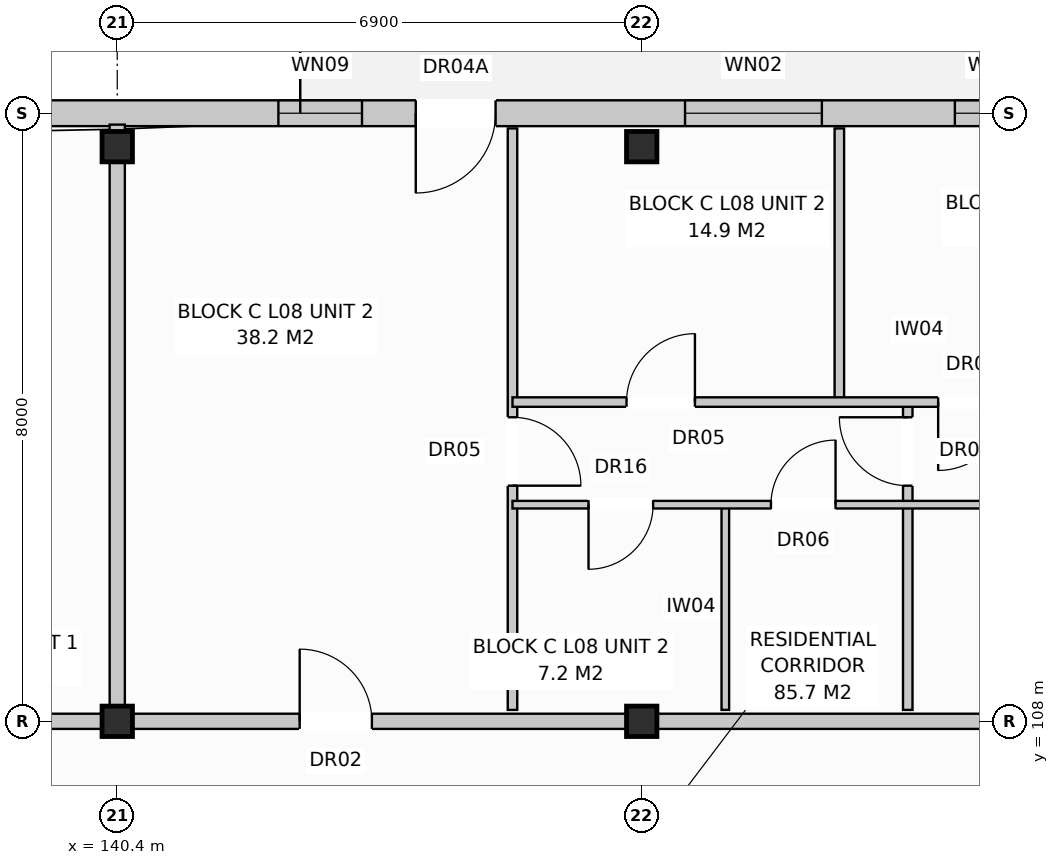
"""IFC4 building model, lengths in metres.
Left out: names, types, materials, properties, quantities, classifications, styles, units other than length and angle.
Written with IfcOpenShell. Run it as: python <this file> out.ifc"""

import sys

from ifc_helpers import new_model, si_unit, direction, frame, frame_2d, origin, origin_with_axes, origin_2d, place, context, subcontext, project, spatial, rectangle, extrude, element, fill, save


model = new_model("IFC4")
c1 = context("Model", 3, precision=1e-05, world=origin(), true_north=direction((0.0, 1.0)))
c2 = subcontext(c1, "Body", "Model", "MODEL_VIEW")
j1 = project(units=[si_unit("LENGTHUNIT", "METRE"), si_unit("PLANEANGLEUNIT", "RADIAN")], contexts=[c1])
p1 = place(None, origin())
s1 = spatial("IfcSite", under=j1, at=p1, CompositionType="ELEMENT")
p2 = place(p1, origin())
s2 = spatial("IfcBuilding", under=s1, at=p2, CompositionType="ELEMENT")
p3 = place(p2, frame((0.0, 0.0, 27.2)))
s3 = spatial("IfcBuildingStorey", under=s2, at=p3, CompositionType="ELEMENT", Elevation=27.2)
for number, where, z_axis, x_axis in (
    (1, (140.4, 108.0, 0.0), (0.0, 0.0, 1.0), (1.0, 0.0, 0.0)),
    (2, (140.4, 115.56, 0.0), (0.0, 0.0, 1.0), (1.0, 0.0, 0.0)),
    (3, (147.3, 108.0, 0.0), (0.0, 0.0, 1.0), (1.0, 0.0, 0.0)),
    (4, (147.3, 115.56, 0.0), (0.0, 0.0, 1.0), (1.0, 0.0, 0.0)),
):
    element("IfcColumn", number, at=place(p3, frame(where, z_axis=z_axis, x_axis=x_axis)), inside=s3, PredefinedType="COLUMN", context=c2, shape_type="SweptSolid", body=[
        extrude(rectangle(XDim=0.4, YDim=0.4, at=origin_2d()), origin(), (0.0, 0.0, 1.0), 3.2),
    ])
p4 = place(p3, frame((126.76, 116.0, 0.0), z_axis=(0.0, 0.0, 1.0), x_axis=(1.0, 0.0, 0.0)))
e5 = element("IfcWall", 5, at=p4, inside=s3, PredefinedType="STANDARD", context=c2, shape_type="SweptSolid", body=[
    extrude(rectangle(XDim=41.08, YDim=0.34, at=frame_2d((20.54, 0.0))), origin(), (0.0, 0.0, 1.0), 2.96),
])
p5 = place(p4, frame((2.767, 0.0, 0.0)))
e6 = element("IfcOpeningElement", 6, at=p5, cuts=e5, PredefinedType="OPENING", context=c2, shape_type="SweptSolid", body=[
    extrude(rectangle(XDim=1.05, YDim=2.12, at=frame_2d((0.525, 1.06))), frame((0.0, 0.182, 0.0), z_axis=(0.0, -1.0, 0.0), x_axis=(1.0, 0.0, 0.0)), (0.0, 0.0, 1.0), 0.364),
])
p6 = place(p4, frame((17.567, 0.0, 0.0)))
e7 = element("IfcOpeningElement", 7, at=p6, cuts=e5, PredefinedType="OPENING", context=c2, shape_type="SweptSolid", body=[
    extrude(rectangle(XDim=1.05, YDim=2.12, at=frame_2d((0.525, 1.06))), frame((0.0, 0.182, 0.0), z_axis=(0.0, -1.0, 0.0), x_axis=(1.0, 0.0, 0.0)), (0.0, 0.0, 1.0), 0.364),
])
p7 = place(p4, frame((30.067, 0.0, 0.0)))
e8 = element("IfcOpeningElement", 8, at=p7, cuts=e5, PredefinedType="OPENING", context=c2, shape_type="SweptSolid", body=[
    extrude(rectangle(XDim=1.05, YDim=2.12, at=frame_2d((0.525, 1.06))), frame((0.0, 0.182, 0.0), z_axis=(0.0, -1.0, 0.0), x_axis=(1.0, 0.0, 0.0)), (0.0, 0.0, 1.0), 0.364),
])
p8 = place(p4, frame((0.642, 0.0, 0.8)))
e9 = element("IfcOpeningElement", 9, at=p8, cuts=e5, PredefinedType="OPENING", context=c2, shape_type="SweptSolid", body=[
    extrude(rectangle(XDim=1.9, YDim=1.85, at=frame_2d((0.95, 0.925))), frame((0.0, 0.182, 0.0), z_axis=(0.0, -1.0, 0.0), x_axis=(1.0, 0.0, 0.0)), (0.0, 0.0, 1.0), 0.364),
])
p9 = place(p4, frame((4.41, 0.0, 0.8)))
e10 = element("IfcOpeningElement", 10, at=p9, cuts=e5, PredefinedType="OPENING", context=c2, shape_type="SweptSolid", body=[
    extrude(rectangle(XDim=1.8, YDim=1.7, at=frame_2d((0.9, 0.85))), frame((0.0, 0.182, 0.0), z_axis=(0.0, -1.0, 0.0), x_axis=(1.0, 0.0, 0.0)), (0.0, 0.0, 1.0), 0.364),
])
p10 = place(p4, frame((10.46, 0.0, 0.72)))
e11 = element("IfcOpeningElement", 11, at=p10, cuts=e5, PredefinedType="OPENING", context=c2, shape_type="SweptSolid", body=[
    extrude(rectangle(XDim=1.1, YDim=1.5, at=frame_2d((0.55, 0.75))), frame((0.0, 0.182, 0.0), z_axis=(0.0, -1.0, 0.0), x_axis=(1.0, 0.0, 0.0)), (0.0, 0.0, 1.0), 0.364),
])
p11 = place(p4, frame((15.76, 0.0, 0.72)))
e12 = element("IfcOpeningElement", 12, at=p11, cuts=e5, PredefinedType="OPENING", context=c2, shape_type="SweptSolid", body=[
    extrude(rectangle(XDim=1.1, YDim=1.5, at=frame_2d((0.55, 0.75))), frame((0.0, 0.182, 0.0), z_axis=(0.0, -1.0, 0.0), x_axis=(1.0, 0.0, 0.0)), (0.0, 0.0, 1.0), 0.364),
])
p12 = place(p4, frame((21.11, 0.0, 0.8)))
e13 = element("IfcOpeningElement", 13, at=p12, cuts=e5, PredefinedType="OPENING", context=c2, shape_type="SweptSolid", body=[
    extrude(rectangle(XDim=1.8, YDim=1.7, at=frame_2d((0.9, 0.85))), frame((0.0, 0.182, 0.0), z_axis=(0.0, -1.0, 0.0), x_axis=(1.0, 0.0, 0.0)), (0.0, 0.0, 1.0), 0.364),
])
p13 = place(p4, frame((24.66, 0.0, 0.72)))
e14 = element("IfcOpeningElement", 14, at=p13, cuts=e5, PredefinedType="OPENING", context=c2, shape_type="SweptSolid", body=[
    extrude(rectangle(XDim=1.1, YDim=1.5, at=frame_2d((0.55, 0.75))), frame((0.0, 0.182, 0.0), z_axis=(0.0, -1.0, 0.0), x_axis=(1.0, 0.0, 0.0)), (0.0, 0.0, 1.0), 0.364),
])
p14 = place(p4, frame((27.892, 0.0, 0.8)))
e15 = element("IfcOpeningElement", 15, at=p14, cuts=e5, PredefinedType="OPENING", context=c2, shape_type="SweptSolid", body=[
    extrude(rectangle(XDim=1.95, YDim=1.65, at=frame_2d((0.975, 0.825))), frame((0.0, 0.182, 0.0), z_axis=(0.0, -1.0, 0.0), x_axis=(1.0, 0.0, 0.0)), (0.0, 0.0, 1.0), 0.364),
])
p15 = place(p4, frame((31.91, 0.0, 0.8)))
e16 = element("IfcOpeningElement", 16, at=p15, cuts=e5, PredefinedType="OPENING", context=c2, shape_type="SweptSolid", body=[
    extrude(rectangle(XDim=1.8, YDim=1.7, at=frame_2d((0.9, 0.85))), frame((0.0, 0.182, 0.0), z_axis=(0.0, -1.0, 0.0), x_axis=(1.0, 0.0, 0.0)), (0.0, 0.0, 1.0), 0.364),
])
p16 = place(p4, frame((35.36, 0.0, 0.72)))
e17 = element("IfcOpeningElement", 17, at=p16, cuts=e5, PredefinedType="OPENING", context=c2, shape_type="SweptSolid", body=[
    extrude(rectangle(XDim=1.9, YDim=1.85, at=frame_2d((0.95, 0.925))), frame((0.0, 0.182, 0.0), z_axis=(0.0, -1.0, 0.0), x_axis=(1.0, 0.0, 0.0)), (0.0, 0.0, 1.0), 0.364),
])
p17 = place(p4, frame((38.525, 0.0, 0.8)))
e18 = element("IfcOpeningElement", 18, at=p17, cuts=e5, PredefinedType="OPENING", context=c2, shape_type="SweptSolid", body=[
    extrude(rectangle(XDim=1.95, YDim=1.65, at=frame_2d((0.975, 0.825))), frame((0.0, 0.182, 0.0), z_axis=(0.0, -1.0, 0.0), x_axis=(1.0, 0.0, 0.0)), (0.0, 0.0, 1.0), 0.364),
])
p18 = place(p3, frame((140.4, 108.15, 0.0), z_axis=(0.0, 0.0, 1.0), x_axis=(0.0, 1.0, 0.0)))
e19 = element("IfcWall", 19, at=p18, inside=s3, PredefinedType="PARTITIONING", context=c2, shape_type="SweptSolid", body=[
    extrude(rectangle(XDim=7.7, YDim=0.2, at=frame_2d((3.85, 0.0))), origin(), (0.0, 0.0, 1.0), 2.96),
])
p19 = place(p3, frame((126.6, 108.0, 0.0), z_axis=(0.0, 0.0, 1.0), x_axis=(1.0, 0.0, 0.0)))
e20 = element("IfcWall", 20, at=p19, inside=s3, PredefinedType="PARTITIONING", context=c2, shape_type="SweptSolid", body=[
    extrude(rectangle(XDim=13.8, YDim=0.2, at=frame_2d((6.9, 0.0))), origin(), (0.0, 0.0, 1.0), 2.4),
])
p20 = place(p19, frame((9.6, 0.0, 0.0)))
e21 = element("IfcOpeningElement", 21, at=p20, cuts=e20, PredefinedType="OPENING", context=c2, shape_type="SweptSolid", body=[
    extrude(rectangle(XDim=0.95, YDim=2.15, at=frame_2d((0.475, 1.075))), frame((0.0, 0.112, 0.0), z_axis=(0.0, -1.0, 0.0), x_axis=(1.0, 0.0, 0.0)), (0.0, 0.0, 1.0), 0.224),
])
p21 = place(p3, frame((140.4, 108.0, 0.0), z_axis=(0.0, 0.0, 1.0), x_axis=(1.0, 0.0, 0.0)))
e22 = element("IfcWall", 22, at=p21, inside=s3, PredefinedType="PARTITIONING", context=c2, shape_type="SweptSolid", body=[
    extrude(rectangle(XDim=13.8, YDim=0.2, at=frame_2d((6.9, 0.0))), origin(), (0.0, 0.0, 1.0), 2.4),
])
p22 = place(p21, frame((2.4, 0.0, 0.0)))
e23 = element("IfcOpeningElement", 23, at=p22, cuts=e22, PredefinedType="OPENING", context=c2, shape_type="SweptSolid", body=[
    extrude(rectangle(XDim=0.95, YDim=2.15, at=frame_2d((0.475, 1.075))), frame((0.0, 0.112, 0.0), z_axis=(0.0, -1.0, 0.0), x_axis=(1.0, 0.0, 0.0)), (0.0, 0.0, 1.0), 0.224),
])
p23 = place(p3, frame((145.6, 108.15, 0.0), z_axis=(0.0, 0.0, 1.0), x_axis=(0.0, 1.0, 0.0)))
e24 = element("IfcWall", 24, at=p23, inside=s3, PredefinedType="PARTITIONING", context=c2, shape_type="SweptSolid", body=[
    extrude(rectangle(XDim=7.65, YDim=0.125, at=frame_2d((3.825, 0.0))), origin(), (0.0, 0.0, 1.0), 2.96),
])
p24 = place(p23, frame((2.95, 0.0, 0.0)))
e25 = element("IfcOpeningElement", 25, at=p24, cuts=e24, PredefinedType="OPENING", context=c2, shape_type="SweptSolid", body=[
    extrude(rectangle(XDim=0.9, YDim=2.1, at=frame_2d((0.45, 1.05))), frame((0.0, 0.074, 0.0), z_axis=(0.0, -1.0, 0.0), x_axis=(1.0, 0.0, 0.0)), (0.0, 0.0, 1.0), 0.149),
])
p25 = place(p3, frame((148.4, 108.15, 0.0), z_axis=(0.0, 0.0, 1.0), x_axis=(0.0, 1.0, 0.0)))
e26 = element("IfcWall", 26, at=p25, inside=s3, PredefinedType="PARTITIONING", context=c2, shape_type="SweptSolid", body=[
    extrude(rectangle(XDim=2.7, YDim=0.1, at=frame_2d((1.35, 0.0))), origin(), (0.0, 0.0, 1.0), 2.96),
])
p26 = place(p3, frame((150.8, 108.15, 0.0), z_axis=(0.0, 0.0, 1.0), x_axis=(0.0, 1.0, 0.0)))
e27 = element("IfcWall", 27, at=p26, inside=s3, PredefinedType="PARTITIONING", context=c2, shape_type="SweptSolid", body=[
    extrude(rectangle(XDim=4.05, YDim=0.125, at=frame_2d((2.025, 0.0))), origin(), (0.0, 0.0, 1.0), 2.59),
])
p27 = place(p26, frame((2.95, 0.0, 0.0)))
e28 = element("IfcOpeningElement", 28, at=p27, cuts=e27, PredefinedType="OPENING", context=c2, shape_type="SweptSolid", body=[
    extrude(rectangle(XDim=0.9, YDim=2.1, at=frame_2d((0.45, 1.05))), frame((0.0, 0.074, 0.0), z_axis=(0.0, -1.0, 0.0), x_axis=(1.0, 0.0, 0.0)), (0.0, 0.0, 1.0), 0.149),
])
p28 = place(p3, frame((149.9, 112.2, 0.0), z_axis=(0.0, 0.0, 1.0), x_axis=(0.0, 1.0, 0.0)))
e29 = element("IfcWall", 29, at=p28, inside=s3, PredefinedType="PARTITIONING", context=c2, shape_type="SweptSolid", body=[
    extrude(rectangle(XDim=3.6, YDim=0.125, at=frame_2d((1.8, 0.0))), origin(), (0.0, 0.0, 1.0), 2.96),
])
p29 = place(p3, frame((145.6, 110.85, 0.0), z_axis=(0.0, 0.0, 1.0), x_axis=(1.0, 0.0, 0.0)))
e30 = element("IfcWall", 30, at=p29, inside=s3, PredefinedType="PARTITIONING", context=c2, shape_type="SweptSolid", body=[
    extrude(rectangle(XDim=8.5, YDim=0.1, at=frame_2d((4.25, 0.0))), origin(), (0.0, 0.0, 1.0), 2.96),
])
p30 = place(p29, frame((1.0, 0.0, 0.0)))
e31 = element("IfcOpeningElement", 31, at=p30, cuts=e30, PredefinedType="OPENING", context=c2, shape_type="SweptSolid", body=[
    extrude(rectangle(XDim=0.85, YDim=2.1, at=frame_2d((0.425, 1.05))), frame((0.0, 0.062, 0.0), z_axis=(0.0, -1.0, 0.0), x_axis=(1.0, 0.0, 0.0)), (0.0, 0.0, 1.0), 0.124),
])
p31 = place(p29, frame((3.4, 0.0, 0.0)))
e32 = element("IfcOpeningElement", 32, at=p31, cuts=e30, PredefinedType="OPENING", context=c2, shape_type="SweptSolid", body=[
    extrude(rectangle(XDim=0.85, YDim=2.05, at=frame_2d((0.425, 1.025))), frame((0.0, 0.062, 0.0), z_axis=(0.0, -1.0, 0.0), x_axis=(1.0, 0.0, 0.0)), (0.0, 0.0, 1.0), 0.124),
])
p32 = place(p29, frame((6.2, 0.0, 0.0)))
e33 = element("IfcOpeningElement", 33, at=p32, cuts=e30, PredefinedType="OPENING", context=c2, shape_type="SweptSolid", body=[
    extrude(rectangle(XDim=0.85, YDim=2.05, at=frame_2d((0.425, 1.025))), frame((0.0, 0.062, 0.0), z_axis=(0.0, -1.0, 0.0), x_axis=(1.0, 0.0, 0.0)), (0.0, 0.0, 1.0), 0.124),
])
p33 = place(p3, frame((145.6, 112.2, 0.0), z_axis=(0.0, 0.0, 1.0), x_axis=(1.0, 0.0, 0.0)))
e34 = element("IfcWall", 34, at=p33, inside=s3, PredefinedType="PARTITIONING", context=c2, shape_type="SweptSolid", body=[
    extrude(rectangle(XDim=8.5, YDim=0.125, at=frame_2d((4.25, 0.0))), origin(), (0.0, 0.0, 1.0), 2.96),
])
p34 = place(p33, frame((1.5, 0.0, 0.0)))
e35 = element("IfcOpeningElement", 35, at=p34, cuts=e34, PredefinedType="OPENING", context=c2, shape_type="SweptSolid", body=[
    extrude(rectangle(XDim=0.9, YDim=2.1, at=frame_2d((0.45, 1.05))), frame((0.0, 0.074, 0.0), z_axis=(0.0, -1.0, 0.0), x_axis=(1.0, 0.0, 0.0)), (0.0, 0.0, 1.0), 0.149),
])
p35 = place(p33, frame((5.6, 0.0, 0.0)))
e36 = element("IfcOpeningElement", 36, at=p35, cuts=e34, PredefinedType="OPENING", context=c2, shape_type="SweptSolid", body=[
    extrude(rectangle(XDim=0.9, YDim=2.1, at=frame_2d((0.45, 1.05))), frame((0.0, 0.074, 0.0), z_axis=(0.0, -1.0, 0.0), x_axis=(1.0, 0.0, 0.0)), (0.0, 0.0, 1.0), 0.149),
])
p36 = place(p6, frame((1.05, 0.0, 0.0), z_axis=(0.0, 0.0, 1.0), x_axis=(-1.0, 0.0, 0.0)))
e37 = element("IfcDoor", 37, at=p36, inside=s3, OperationType="SINGLE_SWING_LEFT", PredefinedType="DOOR", context=c2, shape_type="SweptSolid", body=[
    extrude(rectangle(XDim=1.05, YDim=2.12, at=frame_2d((0.525, 1.06))), frame((0.0, 0.025, 0.0), z_axis=(0.0, -1.0, 0.0), x_axis=(1.0, 0.0, 0.0)), (0.0, 0.0, 1.0), 0.05),
])
fill(e7, e37)
p37 = place(p11, origin_with_axes())
e38 = element("IfcWindow", 38, at=p37, inside=s3, PartitioningType="SINGLE_PANEL", PredefinedType="WINDOW", context=c2, shape_type="SweptSolid", body=[
    extrude(rectangle(XDim=1.1, YDim=1.5, at=frame_2d((0.55, 0.75))), frame((0.0, 0.03, 0.0), z_axis=(0.0, -1.0, 0.0), x_axis=(1.0, 0.0, 0.0)), (0.0, 0.0, 1.0), 0.06),
])
fill(e12, e38)
p38 = place(p12, origin_with_axes())
e39 = element("IfcWindow", 39, at=p38, inside=s3, PartitioningType="SINGLE_PANEL", PredefinedType="WINDOW", context=c2, shape_type="SweptSolid", body=[
    extrude(rectangle(XDim=1.8, YDim=1.7, at=frame_2d((0.9, 0.85))), frame((0.0, 0.03, 0.0), z_axis=(0.0, -1.0, 0.0), x_axis=(1.0, 0.0, 0.0)), (0.0, 0.0, 1.0), 0.06),
])
fill(e13, e39)
p39 = place(p13, origin_with_axes())
e40 = element("IfcWindow", 40, at=p39, inside=s3, PartitioningType="SINGLE_PANEL", PredefinedType="WINDOW", context=c2, shape_type="SweptSolid", body=[
    extrude(rectangle(XDim=1.1, YDim=1.5, at=frame_2d((0.55, 0.75))), frame((0.0, 0.03, 0.0), z_axis=(0.0, -1.0, 0.0), x_axis=(1.0, 0.0, 0.0)), (0.0, 0.0, 1.0), 0.06),
])
fill(e14, e40)
p40 = place(p22, origin_with_axes())
e41 = element("IfcDoor", 41, at=p40, inside=s3, OperationType="SINGLE_SWING_LEFT", PredefinedType="DOOR", context=c2, shape_type="SweptSolid", body=[
    extrude(rectangle(XDim=0.95, YDim=2.15, at=frame_2d((0.475, 1.075))), frame((0.0, 0.025, 0.0), z_axis=(0.0, -1.0, 0.0), x_axis=(1.0, 0.0, 0.0)), (0.0, 0.0, 1.0), 0.05),
])
fill(e23, e41)
p41 = place(p24, frame((0.9, 0.0, 0.0), z_axis=(0.0, 0.0, 1.0), x_axis=(-1.0, 0.0, 0.0)))
e42 = element("IfcDoor", 42, at=p41, inside=s3, OperationType="SINGLE_SWING_LEFT", PredefinedType="DOOR", context=c2, shape_type="SweptSolid", body=[
    extrude(rectangle(XDim=0.9, YDim=2.1, at=frame_2d((0.45, 1.05))), frame((0.0, 0.025, 0.0), z_axis=(0.0, -1.0, 0.0), x_axis=(1.0, 0.0, 0.0)), (0.0, 0.0, 1.0), 0.05),
])
fill(e25, e42)
p42 = place(p27, origin_with_axes())
e43 = element("IfcDoor", 43, at=p42, inside=s3, OperationType="SINGLE_SWING_RIGHT", PredefinedType="DOOR", context=c2, shape_type="SweptSolid", body=[
    extrude(rectangle(XDim=0.9, YDim=2.1, at=frame_2d((0.45, 1.05))), frame((0.0, 0.025, 0.0), z_axis=(0.0, -1.0, 0.0), x_axis=(1.0, 0.0, 0.0)), (0.0, 0.0, 1.0), 0.05),
])
fill(e28, e43)
p43 = place(p30, frame((0.85, 0.0, 0.0), z_axis=(0.0, 0.0, 1.0), x_axis=(-1.0, 0.0, 0.0)))
e44 = element("IfcDoor", 44, at=p43, inside=s3, OperationType="SINGLE_SWING_LEFT", PredefinedType="DOOR", context=c2, shape_type="SweptSolid", body=[
    extrude(rectangle(XDim=0.85, YDim=2.1, at=frame_2d((0.425, 1.05))), frame((0.0, 0.025, 0.0), z_axis=(0.0, -1.0, 0.0), x_axis=(1.0, 0.0, 0.0)), (0.0, 0.0, 1.0), 0.05),
])
fill(e31, e44)
p44 = place(p31, origin_with_axes())
e45 = element("IfcDoor", 45, at=p44, inside=s3, OperationType="SINGLE_SWING_RIGHT", PredefinedType="DOOR", context=c2, shape_type="SweptSolid", body=[
    extrude(rectangle(XDim=0.85, YDim=2.05, at=frame_2d((0.425, 1.025))), frame((0.0, 0.025, 0.0), z_axis=(0.0, -1.0, 0.0), x_axis=(1.0, 0.0, 0.0)), (0.0, 0.0, 1.0), 0.05),
])
fill(e32, e45)
p45 = place(p34, origin_with_axes())
e46 = element("IfcDoor", 46, at=p45, inside=s3, OperationType="SINGLE_SWING_RIGHT", PredefinedType="DOOR", context=c2, shape_type="SweptSolid", body=[
    extrude(rectangle(XDim=0.9, YDim=2.1, at=frame_2d((0.45, 1.05))), frame((0.0, 0.025, 0.0), z_axis=(0.0, -1.0, 0.0), x_axis=(1.0, 0.0, 0.0)), (0.0, 0.0, 1.0), 0.05),
])
fill(e35, e46)
p46 = place(p35, frame((0.9, 0.0, 0.0), z_axis=(0.0, 0.0, 1.0), x_axis=(-1.0, 0.0, 0.0)))
e47 = element("IfcDoor", 47, at=p46, inside=s3, OperationType="SINGLE_SWING_LEFT", PredefinedType="DOOR", context=c2, shape_type="SweptSolid", body=[
    extrude(rectangle(XDim=0.9, YDim=2.1, at=frame_2d((0.45, 1.05))), frame((0.0, 0.025, 0.0), z_axis=(0.0, -1.0, 0.0), x_axis=(1.0, 0.0, 0.0)), (0.0, 0.0, 1.0), 0.05),
])
fill(e36, e47)
save(model, sys.argv[1])
